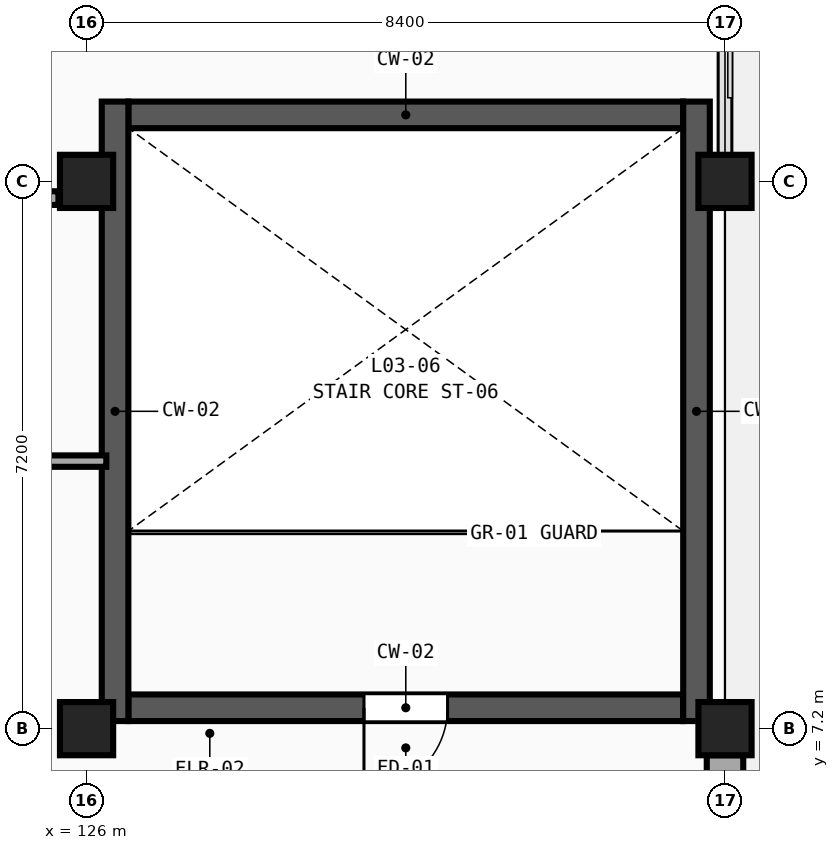
"""IFC4 building model, lengths in metres.
Left out: names, types, materials, properties, quantities, classifications, styles, units other than length and angle.
Written with IfcOpenShell. Run it as: python <this file> out.ifc"""

import sys

from ifc_helpers import new_model, si_unit, direction, frame, frame_2d, origin, origin_2d, place, context, subcontext, project, spatial, rectangle, extrude, element, fill, save


model = new_model("IFC4")
c1 = context("Model", 3, precision=1e-05, world=origin(), true_north=direction((0.0, 1.0)))
c2 = subcontext(c1, "Body", "Model", "MODEL_VIEW")
j1 = project(units=[si_unit("LENGTHUNIT", "METRE"), si_unit("PLANEANGLEUNIT", "RADIAN")], contexts=[c1])
p1 = place(None, origin())
s1 = spatial("IfcSite", under=j1, at=p1, CompositionType="ELEMENT")
p2 = place(p1, origin())
s2 = spatial("IfcBuilding", under=s1, at=p2, CompositionType="ELEMENT")
p3 = place(p2, frame((0.0, 0.0, 14.4)))
s3 = spatial("IfcBuildingStorey", under=s2, at=p3, CompositionType="ELEMENT", Elevation=14.4)
p4 = place(p3, frame((126.0, 7.2, 0.0), z_axis=(0.0, 0.0, 1.0), x_axis=(1.0, 0.0, 0.0)))
e1 = element("IfcColumn", 1, at=p4, inside=s3, PredefinedType="COLUMN", context=c2, shape_type="SweptSolid", body=[
    extrude(rectangle(XDim=0.7, YDim=0.7, at=origin_2d()), origin(), (0.0, 0.0, 1.0), 6.45),
])
p5 = place(p3, frame((126.0, 14.4, 0.0), z_axis=(0.0, 0.0, 1.0), x_axis=(1.0, 0.0, 0.0)))
e2 = element("IfcColumn", 2, at=p5, inside=s3, PredefinedType="COLUMN", context=c2, shape_type="SweptSolid", body=[
    extrude(rectangle(XDim=0.7, YDim=0.7, at=origin_2d()), origin(), (0.0, 0.0, 1.0), 4.5),
])
p6 = place(p3, frame((134.4, 7.2, 0.0), z_axis=(0.0, 0.0, 1.0), x_axis=(1.0, 0.0, 0.0)))
e3 = element("IfcColumn", 3, at=p6, inside=s3, PredefinedType="COLUMN", context=c2, shape_type="SweptSolid", body=[
    extrude(rectangle(XDim=0.7, YDim=0.7, at=origin_2d()), origin(), (0.0, 0.0, 1.0), 6.45),
])
p7 = place(p3, frame((134.4, 14.4, 0.0), z_axis=(0.0, 0.0, 1.0), x_axis=(1.0, 0.0, 0.0)))
e4 = element("IfcColumn", 4, at=p7, inside=s3, PredefinedType="COLUMN", context=c2, shape_type="SweptSolid", body=[
    extrude(rectangle(XDim=0.7, YDim=0.7, at=origin_2d()), origin(), (0.0, 0.0, 1.0), 4.5),
])
p8 = place(p3, frame((134.4, 6.85, 0.0), z_axis=(0.0, 0.0, 1.0), x_axis=(0.0, -1.0, 0.0)))
e5 = element("IfcWall", 5, at=p8, inside=s3, PredefinedType="SOLIDWALL", context=c2, shape_type="SweptSolid", body=[
    extrude(rectangle(XDim=6.5, YDim=0.48, at=frame_2d((3.25, 0.0))), origin(), (0.0, 0.0, 1.0), 3.63),
])
p9 = place(p8, frame((0.92, 0.0, 0.75)))
e6 = element("IfcOpeningElement", 6, at=p9, cuts=e5, PredefinedType="OPENING", context=c2, shape_type="SweptSolid", body=[
    extrude(rectangle(XDim=1.8, YDim=2.44, at=frame_2d((0.9, 1.22))), frame((0.0, 0.26, 0.0), z_axis=(0.0, -1.0, 0.0), x_axis=(1.0, 0.0, 0.0)), (0.0, 0.0, 1.0), 0.52),
])
p10 = place(p8, frame((3.68, 0.0, 0.75)))
e7 = element("IfcOpeningElement", 7, at=p10, cuts=e5, PredefinedType="OPENING", context=c2, shape_type="SweptSolid", body=[
    extrude(rectangle(XDim=2.0, YDim=2.44, at=frame_2d((1.0, 1.22))), frame((0.0, 0.26, 0.0), z_axis=(0.0, -1.0, 0.0), x_axis=(1.0, 0.0, 0.0)), (0.0, 0.0, 1.0), 0.52),
])
p11 = place(p3, frame((133.85, 7.475, 0.0), z_axis=(0.0, 0.0, 1.0), x_axis=(-1.0, 0.0, 0.0)))
e8 = element("IfcWall", 8, at=p11, inside=s3, PredefinedType="SHEAR", context=c2, shape_type="SweptSolid", body=[
    extrude(rectangle(XDim=7.3, YDim=0.35, at=frame_2d((3.65, 0.0))), origin(), (0.0, 0.0, 1.0), 4.5),
])
p12 = place(p11, frame((3.1, 0.0, 0.0)))
e9 = element("IfcOpeningElement", 9, at=p12, cuts=e8, PredefinedType="OPENING", context=c2, shape_type="SweptSolid", body=[
    extrude(rectangle(XDim=1.1, YDim=2.2, at=frame_2d((0.55, 1.1))), frame((0.0, 0.195, 0.0), z_axis=(0.0, -1.0, 0.0), x_axis=(1.0, 0.0, 0.0)), (0.0, 0.0, 1.0), 0.39),
])
p13 = place(p3, frame((126.55, 15.275, 0.0), z_axis=(0.0, 0.0, 1.0), x_axis=(1.0, 0.0, 0.0)))
e10 = element("IfcWall", 10, at=p13, inside=s3, PredefinedType="SHEAR", context=c2, shape_type="SweptSolid", body=[
    extrude(rectangle(XDim=7.3, YDim=0.35, at=frame_2d((3.65, 0.0))), origin(), (0.0, 0.0, 1.0), 4.5),
])
for number, where, z_axis, x_axis in (
    (11, (126.375, 15.45, 0.0), (0.0, 0.0, 1.0), (0.0, -1.0, 0.0)),
    (12, (134.025, 7.3, 0.0), (0.0, 0.0, 1.0), (0.0, 1.0, 0.0)),
):
    element("IfcWall", number, at=place(p3, frame(where, z_axis=z_axis, x_axis=x_axis)), inside=s3, PredefinedType="SHEAR", context=c2, shape_type="SweptSolid", body=[
        extrude(rectangle(XDim=8.15, YDim=0.35, at=frame_2d((4.075, 0.0))), origin(), (0.0, 0.0, 1.0), 4.5),
    ])
p14 = place(p3, frame((117.97, 14.18, 0.0), z_axis=(0.0, 0.0, 1.0), x_axis=(1.0, 0.0, 0.0)))
e13 = element("IfcWall", 13, at=p14, inside=s3, PredefinedType="PARTITIONING", context=c2, shape_type="SweptSolid", body=[
    extrude(rectangle(XDim=7.66, YDim=0.18, at=frame_2d((3.83, 0.0))), origin(), (0.0, 0.0, 1.0), 3.73),
])
p15 = place(p14, frame((2.99, 0.0, 0.0)))
e14 = element("IfcOpeningElement", 14, at=p15, cuts=e13, PredefinedType="OPENING", context=c2, shape_type="SweptSolid", body=[
    extrude(rectangle(XDim=1.68, YDim=2.29, at=frame_2d((0.84, 1.145))), frame((0.0, 0.11, 0.0), z_axis=(0.0, -1.0, 0.0), x_axis=(1.0, 0.0, 0.0)), (0.0, 0.0, 1.0), 0.22),
])
p16 = place(p3, frame((115.79, 10.72, 0.0), z_axis=(0.0, 0.0, 1.0), x_axis=(1.0, 0.0, 0.0)))
e15 = element("IfcWall", 15, at=p16, inside=s3, PredefinedType="PARTITIONING", context=c2, shape_type="SweptSolid", body=[
    extrude(rectangle(XDim=10.47, YDim=0.15, at=frame_2d((5.235, 0.0))), origin(), (0.0, 0.0, 1.0), 4.18),
])
p17 = place(p16, frame((4.555, 0.0, 0.0)))
e16 = element("IfcOpeningElement", 16, at=p17, cuts=e15, PredefinedType="OPENING", context=c2, shape_type="SweptSolid", body=[
    extrude(rectangle(XDim=1.36, YDim=2.37, at=frame_2d((0.68, 1.185))), frame((0.0, 0.095, 0.0), z_axis=(0.0, -1.0, 0.0), x_axis=(1.0, 0.0, 0.0)), (0.0, 0.0, 1.0), 0.19),
])
p18 = place(p12, origin())
e17 = element("IfcDoor", 17, at=p18, inside=s3, OperationType="SINGLE_SWING_RIGHT", PredefinedType="DOOR", context=c2, shape_type="SweptSolid", body=[
    extrude(rectangle(XDim=1.1, YDim=2.2, at=frame_2d((0.55, 1.1))), frame((0.0, 0.025, 0.0), z_axis=(0.0, -1.0, 0.0), x_axis=(1.0, 0.0, 0.0)), (0.0, 0.0, 1.0), 0.05),
])
fill(e9, e17)
save(model, sys.argv[1])
